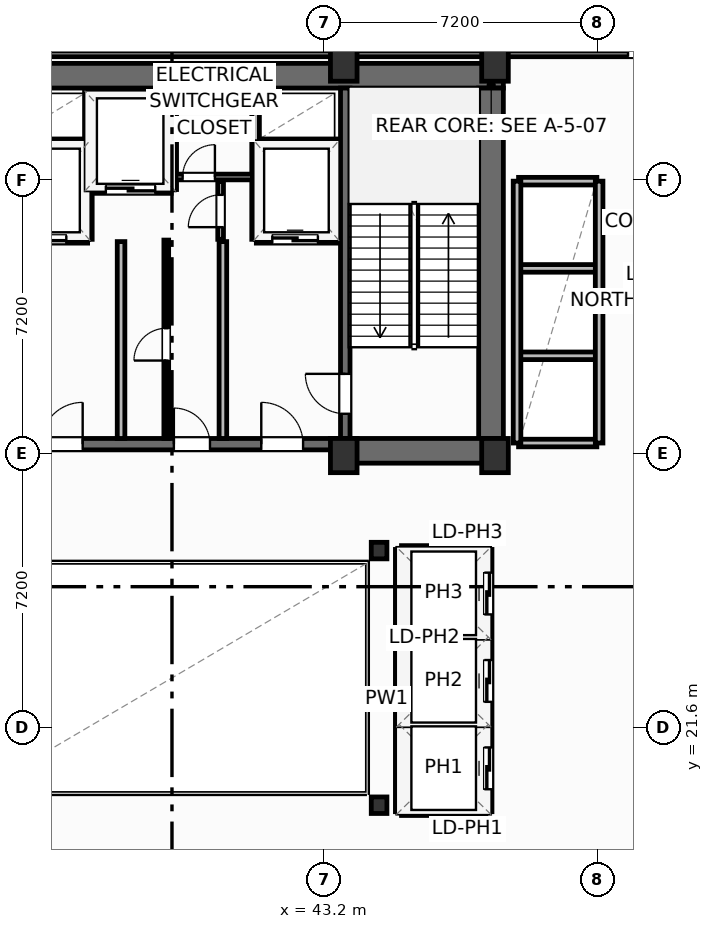
"""IFC4 building model, lengths in metres.
Left out: names, types, materials, properties, quantities, classifications, styles, units other than length and angle.
Written with IfcOpenShell. Run it as: python <this file> out.ifc"""

import sys

from ifc_helpers import new_model, si_unit, direction, frame, frame_2d, origin, origin_2d, place, context, subcontext, project, spatial, rectangle, i_section, extrude, element, fill, save


model = new_model("IFC4")
c1 = context("Model", 3, precision=1e-05, world=origin(), true_north=direction((0.0, 1.0)))
c2 = subcontext(c1, "Body", "Model", "MODEL_VIEW")
j1 = project(units=[si_unit("LENGTHUNIT", "METRE"), si_unit("PLANEANGLEUNIT", "RADIAN")], contexts=[c1])
p1 = place(None, origin())
s1 = spatial("IfcSite", under=j1, at=p1, CompositionType="ELEMENT")
p2 = place(p1, origin())
s2 = spatial("IfcBuilding", under=s1, at=p2, CompositionType="ELEMENT")
p3 = place(p2, frame((0.0, 0.0, 207.9)))
s3 = spatial("IfcBuildingStorey", under=s2, at=p3, CompositionType="ELEMENT", Elevation=207.9)
for number, where, z_axis, x_axis in (
    (1, (43.72, 28.75, 0.0), (0.0, 0.0, 1.0), (1.0, 0.0, 0.0)),
    (2, (47.7, 28.75, 0.0), (0.0, 0.0, 1.0), (1.0, 0.0, 0.0)),
    (3, (43.72, 39.05, 0.0), (0.0, 0.0, 1.0), (1.0, 0.0, 0.0)),
    (4, (47.7, 39.05, 0.0), (0.0, 0.0, 1.0), (1.0, 0.0, 0.0)),
):
    element("IfcColumn", number, at=place(p3, frame(where, z_axis=z_axis, x_axis=x_axis)), inside=s3, PredefinedType="COLUMN", context=c2, shape_type="SweptSolid", body=[
        extrude(rectangle(XDim=0.7, YDim=0.9, at=origin_2d()), origin(), (0.0, 0.0, 1.0), 4.8),
    ])
for number, where, z_axis, x_axis in (
    (5, (44.65, 19.55, 0.0), (0.0, 0.0, 1.0), (1.0, 0.0, 0.0)),
    (6, (44.65, 26.25, 0.0), (0.0, 0.0, 1.0), (1.0, 0.0, 0.0)),
):
    element("IfcColumn", number, at=place(p3, frame(where, z_axis=z_axis, x_axis=x_axis)), inside=s3, PredefinedType="COLUMN", context=c2, shape_type="SweptSolid", body=[
        extrude(i_section(OverallWidth=0.412, OverallDepth=0.435, WebThickness=0.036, FlangeThickness=0.057, FilletRadius=0.025, at=origin_2d()), origin(), (0.0, 0.0, 1.0), 4.8),
    ])
p4 = place(p3, frame((30.48, 38.745, 0.0), z_axis=(0.0, 0.0, 1.0), x_axis=(1.0, 0.0, 0.0)))
e7 = element("IfcWall", 7, at=p4, inside=s3, PredefinedType="SHEAR", context=c2, shape_type="SweptSolid", body=[
    extrude(rectangle(XDim=17.44, YDim=0.65, at=frame_2d((8.72, 0.0))), origin(), (0.0, 0.0, 1.0), 4.55),
])
p5 = place(p3, frame((47.595, 29.2, 0.0), z_axis=(0.0, 0.0, 1.0), x_axis=(0.0, 1.0, 0.0)))
e8 = element("IfcWall", 8, at=p5, inside=s3, PredefinedType="SHEAR", context=c2, shape_type="SweptSolid", body=[
    extrude(rectangle(XDim=9.22, YDim=0.65, at=frame_2d((4.61, 0.0))), origin(), (0.0, 0.0, 1.0), 4.55),
])
p6 = place(p3, frame((43.6, 28.875, 0.0), z_axis=(0.0, 0.0, 1.0), x_axis=(1.0, 0.0, 0.0)))
e9 = element("IfcWall", 9, at=p6, inside=s3, PredefinedType="SHEAR", context=c2, shape_type="SweptSolid", body=[
    extrude(rectangle(XDim=4.32, YDim=0.65, at=frame_2d((2.16, 0.0))), origin(), (0.0, 0.0, 1.0), 4.55),
])
p7 = place(p3, frame((34.8, 29.05, 0.0), z_axis=(0.0, 0.0, 1.0), x_axis=(1.0, 0.0, 0.0)))
e10 = element("IfcWall", 10, at=p7, inside=s3, PredefinedType="SHEAR", context=c2, shape_type="SweptSolid", body=[
    extrude(rectangle(XDim=8.8, YDim=0.3, at=frame_2d((4.4, 0.0))), origin(), (0.0, 0.0, 1.0), 4.55),
])
p8 = place(p7, frame((0.95, 0.0, 0.0)))
e11 = element("IfcOpeningElement", 11, at=p8, cuts=e10, PredefinedType="OPENING", context=c2, shape_type="SweptSolid", body=[
    extrude(rectangle(XDim=1.1, YDim=2.15, at=frame_2d((0.55, 1.075))), frame((0.0, 0.16, 0.0), z_axis=(0.0, -1.0, 0.0), x_axis=(1.0, 0.0, 0.0)), (0.0, 0.0, 1.0), 0.32),
])
p9 = place(p7, frame((6.75, 0.0, 0.0)))
e12 = element("IfcOpeningElement", 12, at=p9, cuts=e10, PredefinedType="OPENING", context=c2, shape_type="SweptSolid", body=[
    extrude(rectangle(XDim=1.1, YDim=2.15, at=frame_2d((0.55, 1.075))), frame((0.0, 0.16, 0.0), z_axis=(0.0, -1.0, 0.0), x_axis=(1.0, 0.0, 0.0)), (0.0, 0.0, 1.0), 0.32),
])
p10 = place(p7, frame((4.45, 0.0, 0.0)))
e13 = element("IfcOpeningElement", 13, at=p10, cuts=e10, PredefinedType="OPENING", context=c2, shape_type="SweptSolid", body=[
    extrude(rectangle(XDim=0.95, YDim=2.15, at=frame_2d((0.475, 1.075))), frame((0.0, 0.16, 0.0), z_axis=(0.0, -1.0, 0.0), x_axis=(1.0, 0.0, 0.0)), (0.0, 0.0, 1.0), 0.32),
])
p11 = place(p3, frame((43.76, 29.2, 0.0), z_axis=(0.0, 0.0, 1.0), x_axis=(0.0, 1.0, 0.0)))
e14 = element("IfcWall", 14, at=p11, inside=s3, PredefinedType="SHEAR", context=c2, shape_type="SweptSolid", body=[
    extrude(rectangle(XDim=9.22, YDim=0.25, at=frame_2d((4.61, 0.0))), origin(), (0.0, 0.0, 1.0), 4.55),
])
p12 = place(p11, frame((0.65, 0.0, 0.0)))
e15 = element("IfcOpeningElement", 15, at=p12, cuts=e14, PredefinedType="OPENING", context=c2, shape_type="SweptSolid", body=[
    extrude(rectangle(XDim=1.05, YDim=2.15, at=frame_2d((0.525, 1.075))), frame((0.0, 0.135, 0.0), z_axis=(0.0, -1.0, 0.0), x_axis=(1.0, 0.0, 0.0)), (0.0, 0.0, 1.0), 0.27),
])
p13 = place(p3, frame((8.315, 33.164, 0.0), z_axis=(0.0, 0.0, 1.0), x_axis=(0.935222646765, 0.354060165759, 0.0)))
e16 = element("IfcWall", 16, at=p13, inside=s3, PredefinedType="SOLIDWALL", context=c2, shape_type="SweptSolid", body=[
    extrude(rectangle(XDim=52.2, YDim=0.22, at=frame_2d((26.1, 0.0))), origin(), (0.0, 0.0, 1.0), 3.83),
])
p14 = place(p13, frame((23.64, 0.0, 0.0)))
e17 = element("IfcOpeningElement", 17, at=p14, cuts=e16, PredefinedType="OPENING", context=c2, shape_type="SweptSolid", body=[
    extrude(rectangle(XDim=1.85, YDim=2.3, at=frame_2d((0.925, 1.15))), frame((0.0, 0.12, 0.0), z_axis=(0.0, -1.0, 0.0), x_axis=(1.0, 0.0, 0.0)), (0.0, 0.0, 1.0), 0.24),
])
p15 = place(p13, frame((0.55, 0.0, 0.75)))
e18 = element("IfcOpeningElement", 18, at=p15, cuts=e16, PredefinedType="OPENING", context=c2, shape_type="SweptSolid", body=[
    extrude(rectangle(XDim=1.85, YDim=1.75, at=frame_2d((0.925, 0.875))), frame((0.0, 0.12, 0.0), z_axis=(0.0, -1.0, 0.0), x_axis=(1.0, 0.0, 0.0)), (0.0, 0.0, 1.0), 0.24),
])
p16 = place(p13, frame((49.8, 0.0, 0.75)))
e19 = element("IfcOpeningElement", 19, at=p16, cuts=e16, PredefinedType="OPENING", context=c2, shape_type="SweptSolid", body=[
    extrude(rectangle(XDim=1.85, YDim=1.75, at=frame_2d((0.925, 0.875))), frame((0.0, 0.12, 0.0), z_axis=(0.0, -1.0, 0.0), x_axis=(1.0, 0.0, 0.0)), (0.0, 0.0, 1.0), 0.24),
])
p17 = place(p3, frame((20.0, 39.32, 0.0), z_axis=(0.0, 0.0, 1.0), x_axis=(1.0, 0.0, 0.0)))
e20 = element("IfcWall", 20, at=p17, inside=s3, PredefinedType="PARTITIONING", context=c2, shape_type="SweptSolid", body=[
    extrude(rectangle(XDim=40.0, YDim=0.15, at=frame_2d((20.0, 0.0))), origin(), (0.0, 0.0, 1.0), 4.55),
])
p18 = place(p17, frame((31.2, 0.0, 0.0)))
e21 = element("IfcOpeningElement", 21, at=p18, cuts=e20, PredefinedType="OPENING", context=c2, shape_type="SweptSolid", body=[
    extrude(rectangle(XDim=1.0, YDim=2.05, at=frame_2d((0.5, 1.025))), frame((0.0, 0.085, 0.0), z_axis=(0.0, -1.0, 0.0), x_axis=(1.0, 0.0, 0.0)), (0.0, 0.0, 1.0), 0.17),
])
for number, where, z_axis, x_axis in (
    (22, (37.86, 29.2, 0.0), (0.0, 0.0, 1.0), (0.0, 1.0, 0.0)),
    (23, (40.54, 29.2, 0.0), (0.0, 0.0, 1.0), (0.0, 1.0, 0.0)),
):
    element("IfcWall", number, at=place(p3, frame(where, z_axis=z_axis, x_axis=x_axis)), inside=s3, PredefinedType="PARTITIONING", context=c2, shape_type="SweptSolid", body=[
        extrude(rectangle(XDim=5.18, YDim=0.2, at=frame_2d((2.59, 0.0))), origin(), (0.0, 0.0, 1.0), 4.55),
    ])
p19 = place(p3, frame((34.8, 34.44, 0.0), z_axis=(0.0, 0.0, 1.0), x_axis=(1.0, 0.0, 0.0)))
e24 = element("IfcWall", 24, at=p19, inside=s3, PredefinedType="PARTITIONING", context=c2, shape_type="SweptSolid", body=[
    extrude(rectangle(XDim=2.18, YDim=0.2, at=frame_2d((1.09, 0.0))), origin(), (0.0, 0.0, 1.0), 4.55),
])
p20 = place(p19, frame((0.42, 0.0, 0.0)))
e25 = element("IfcOpeningElement", 25, at=p20, cuts=e24, PredefinedType="OPENING", context=c2, shape_type="SweptSolid", body=[
    extrude(rectangle(XDim=1.2, YDim=2.2, at=frame_2d((0.6, 1.1))), frame((0.0, 0.11, 0.0), z_axis=(0.0, -1.0, 0.0), x_axis=(1.0, 0.0, 0.0)), (0.0, 0.0, 1.0), 0.22),
])
p21 = place(p3, frame((34.8, 36.98, 0.0), z_axis=(0.0, 0.0, 1.0), x_axis=(1.0, 0.0, 0.0)))
e26 = element("IfcWall", 26, at=p21, inside=s3, PredefinedType="PARTITIONING", context=c2, shape_type="SweptSolid", body=[
    extrude(rectangle(XDim=2.18, YDim=0.2, at=frame_2d((1.09, 0.0))), origin(), (0.0, 0.0, 1.0), 4.55),
])
p22 = place(p3, frame((37.0, 34.44, 0.0), z_axis=(0.0, 0.0, 1.0), x_axis=(0.0, 1.0, 0.0)))
e27 = element("IfcWall", 27, at=p22, inside=s3, PredefinedType="PARTITIONING", context=c2, shape_type="SweptSolid", body=[
    extrude(rectangle(XDim=3.9, YDim=0.2, at=frame_2d((1.95, 0.0))), origin(), (0.0, 0.0, 1.0), 4.55),
])
p23 = place(p3, frame((41.42, 34.44, 0.0), z_axis=(0.0, 0.0, 1.0), x_axis=(1.0, 0.0, 0.0)))
e28 = element("IfcWall", 28, at=p23, inside=s3, PredefinedType="PARTITIONING", context=c2, shape_type="SweptSolid", body=[
    extrude(rectangle(XDim=2.18, YDim=0.2, at=frame_2d((1.09, 0.0))), origin(), (0.0, 0.0, 1.0), 4.55),
])
p24 = place(p23, frame((0.42, 0.0, 0.0)))
e29 = element("IfcOpeningElement", 29, at=p24, cuts=e28, PredefinedType="OPENING", context=c2, shape_type="SweptSolid", body=[
    extrude(rectangle(XDim=1.2, YDim=2.2, at=frame_2d((0.6, 1.1))), frame((0.0, 0.11, 0.0), z_axis=(0.0, -1.0, 0.0), x_axis=(1.0, 0.0, 0.0)), (0.0, 0.0, 1.0), 0.22),
])
p25 = place(p3, frame((41.42, 36.98, 0.0), z_axis=(0.0, 0.0, 1.0), x_axis=(1.0, 0.0, 0.0)))
e30 = element("IfcWall", 30, at=p25, inside=s3, PredefinedType="PARTITIONING", context=c2, shape_type="SweptSolid", body=[
    extrude(rectangle(XDim=2.18, YDim=0.2, at=frame_2d((1.09, 0.0))), origin(), (0.0, 0.0, 1.0), 4.55),
])
p26 = place(p3, frame((41.4, 34.44, 0.0), z_axis=(0.0, 0.0, 1.0), x_axis=(0.0, 1.0, 0.0)))
e31 = element("IfcWall", 31, at=p26, inside=s3, PredefinedType="PARTITIONING", context=c2, shape_type="SweptSolid", body=[
    extrude(rectangle(XDim=3.9, YDim=0.2, at=frame_2d((1.95, 0.0))), origin(), (0.0, 0.0, 1.0), 4.55),
])
p27 = place(p3, frame((37.06, 35.75, 0.0), z_axis=(0.0, 0.0, 1.0), x_axis=(1.0, 0.0, 0.0)))
e32 = element("IfcWall", 32, at=p27, inside=s3, PredefinedType="PARTITIONING", context=c2, shape_type="SweptSolid", body=[
    extrude(rectangle(XDim=2.12, YDim=0.2, at=frame_2d((1.06, 0.0))), origin(), (0.0, 0.0, 1.0), 4.55),
])
p28 = place(p27, frame((0.4, 0.0, 0.0)))
e33 = element("IfcOpeningElement", 33, at=p28, cuts=e32, PredefinedType="OPENING", context=c2, shape_type="SweptSolid", body=[
    extrude(rectangle(XDim=1.3, YDim=2.2, at=frame_2d((0.65, 1.1))), frame((0.0, 0.11, 0.0), z_axis=(0.0, -1.0, 0.0), x_axis=(1.0, 0.0, 0.0)), (0.0, 0.0, 1.0), 0.22),
])
p29 = place(p3, frame((39.22, 35.75, 0.0), z_axis=(0.0, 0.0, 1.0), x_axis=(0.0, 1.0, 0.0)))
e34 = element("IfcWall", 34, at=p29, inside=s3, PredefinedType="PARTITIONING", context=c2, shape_type="SweptSolid", body=[
    extrude(rectangle(XDim=2.59, YDim=0.2, at=frame_2d((1.295, 0.0))), origin(), (0.0, 0.0, 1.0), 4.55),
])
p30 = place(p3, frame((39.3, 36.08, 0.0), z_axis=(0.0, 0.0, 1.0), x_axis=(1.0, 0.0, 0.0)))
e35 = element("IfcWall", 35, at=p30, inside=s3, PredefinedType="PARTITIONING", context=c2, shape_type="SweptSolid", body=[
    extrude(rectangle(XDim=2.02, YDim=0.15, at=frame_2d((1.01, 0.0))), origin(), (0.0, 0.0, 1.0), 4.55),
])
p31 = place(p30, frame((0.18, 0.0, 0.0)))
e36 = element("IfcOpeningElement", 36, at=p31, cuts=e35, PredefinedType="OPENING", context=c2, shape_type="SweptSolid", body=[
    extrude(rectangle(XDim=0.85, YDim=2.05, at=frame_2d((0.425, 1.025))), frame((0.0, 0.085, 0.0), z_axis=(0.0, -1.0, 0.0), x_axis=(1.0, 0.0, 0.0)), (0.0, 0.0, 1.0), 0.17),
])
p32 = place(p3, frame((40.48, 34.44, 0.0), z_axis=(0.0, 0.0, 1.0), x_axis=(0.0, 1.0, 0.0)))
e37 = element("IfcWall", 37, at=p32, inside=s3, PredefinedType="PARTITIONING", context=c2, shape_type="SweptSolid", body=[
    extrude(rectangle(XDim=1.52, YDim=0.15, at=frame_2d((0.76, 0.0))), origin(), (0.0, 0.0, 1.0), 4.55),
])
p33 = place(p32, frame((0.32, 0.0, 0.0)))
e38 = element("IfcOpeningElement", 38, at=p33, cuts=e37, PredefinedType="OPENING", context=c2, shape_type="SweptSolid", body=[
    extrude(rectangle(XDim=0.85, YDim=2.05, at=frame_2d((0.425, 1.025))), frame((0.0, 0.085, 0.0), z_axis=(0.0, -1.0, 0.0), x_axis=(1.0, 0.0, 0.0)), (0.0, 0.0, 1.0), 0.17),
])
p34 = place(p3, frame((39.05, 29.2, 0.0), z_axis=(0.0, 0.0, 1.0), x_axis=(0.0, 1.0, 0.0)))
e39 = element("IfcWall", 39, at=p34, inside=s3, PredefinedType="PARTITIONING", context=c2, shape_type="SweptSolid", body=[
    extrude(rectangle(XDim=5.22, YDim=0.125, at=frame_2d((2.61, 0.0))), origin(), (0.0, 0.0, 1.0), 4.55),
])
p35 = place(p34, frame((2.05, 0.0, 0.0)))
e40 = element("IfcOpeningElement", 40, at=p35, cuts=e39, PredefinedType="OPENING", context=c2, shape_type="SweptSolid", body=[
    extrude(rectangle(XDim=0.85, YDim=2.05, at=frame_2d((0.425, 1.025))), frame((0.0, 0.073, 0.0), z_axis=(0.0, -1.0, 0.0), x_axis=(1.0, 0.0, 0.0)), (0.0, 0.0, 1.0), 0.145),
])
for number, where, z_axis, x_axis in (
    (41, (48.32, 31.375, 0.0), (0.0, 0.0, 1.0), (1.0, 0.0, 0.0)),
    (42, (48.32, 33.675, 0.0), (0.0, 0.0, 1.0), (1.0, 0.0, 0.0)),
):
    element("IfcWall", number, at=place(p3, frame(where, z_axis=z_axis, x_axis=x_axis)), inside=s3, PredefinedType="PARTITIONING", context=c2, shape_type="SweptSolid", body=[
        extrude(rectangle(XDim=2.06, YDim=0.2, at=frame_2d((1.03, 0.0))), origin(), (0.0, 0.0, 1.0), 4.55),
    ])
p36 = place(p3, frame((48.32, 29.08, 0.0), z_axis=(0.0, 0.0, 1.0), x_axis=(1.0, 0.0, 0.0)))
e43 = element("IfcWall", 43, at=p36, inside=s3, PredefinedType="PARTITIONING", context=c2, shape_type="SweptSolid", body=[
    extrude(rectangle(XDim=2.06, YDim=0.2, at=frame_2d((1.03, 0.0))), origin(), (0.0, 0.0, 1.0), 3.762),
])
p37 = place(p3, frame((48.32, 35.97, 0.0), z_axis=(0.0, 0.0, 1.0), x_axis=(1.0, 0.0, 0.0)))
e44 = element("IfcWall", 44, at=p37, inside=s3, PredefinedType="PARTITIONING", context=c2, shape_type="SweptSolid", body=[
    extrude(rectangle(XDim=2.06, YDim=0.2, at=frame_2d((1.03, 0.0))), origin(), (0.0, 0.0, 1.0), 4.55),
])
for number, where, z_axis, x_axis in (
    (45, (48.28, 29.08, 0.0), (0.0, 0.0, 1.0), (0.0, 1.0, 0.0)),
    (46, (50.44, 29.08, 0.0), (0.0, 0.0, 1.0), (0.0, 1.0, 0.0)),
):
    element("IfcWall", number, at=place(p3, frame(where, z_axis=z_axis, x_axis=x_axis)), inside=s3, PredefinedType="PARTITIONING", context=c2, shape_type="SweptSolid", body=[
        extrude(rectangle(XDim=6.89, YDim=0.2, at=frame_2d((3.445, 0.0))), origin(), (0.0, 0.0, 1.0), 4.55),
    ])
for number, where, z_axis, x_axis in (
    (47, (45.24, 21.675, 0.0), (0.0, 0.0, 1.0), (1.0, 0.0, 0.0)),
    (48, (45.24, 23.975, 0.0), (0.0, 0.0, 1.0), (1.0, 0.0, 0.0)),
):
    element("IfcWall", number, at=place(p3, frame(where, z_axis=z_axis, x_axis=x_axis)), inside=s3, PredefinedType="PARTITIONING", context=c2, shape_type="SweptSolid", body=[
        extrude(rectangle(XDim=2.22, YDim=0.2, at=frame_2d((1.11, 0.0))), origin(), (0.0, 0.0, 1.0), 4.55),
    ])
p38 = place(p3, frame((45.24, 19.38, 0.0), z_axis=(0.0, 0.0, 1.0), x_axis=(1.0, 0.0, 0.0)))
e49 = element("IfcWall", 49, at=p38, inside=s3, PredefinedType="PARTITIONING", context=c2, shape_type="SweptSolid", body=[
    extrude(rectangle(XDim=2.22, YDim=0.2, at=frame_2d((1.11, 0.0))), origin(), (0.0, 0.0, 1.0), 3.762),
])
p39 = place(p3, frame((45.24, 26.28, 0.0), z_axis=(0.0, 0.0, 1.0), x_axis=(1.0, 0.0, 0.0)))
e50 = element("IfcWall", 50, at=p39, inside=s3, PredefinedType="PARTITIONING", context=c2, shape_type="SweptSolid", body=[
    extrude(rectangle(XDim=2.22, YDim=0.2, at=frame_2d((1.11, 0.0))), origin(), (0.0, 0.0, 1.0), 4.55),
])
p40 = place(p3, frame((45.18, 19.38, 0.0), z_axis=(0.0, 0.0, 1.0), x_axis=(0.0, 1.0, 0.0)))
e51 = element("IfcWall", 51, at=p40, inside=s3, PredefinedType="PARTITIONING", context=c2, shape_type="SweptSolid", body=[
    extrude(rectangle(XDim=6.9, YDim=0.2, at=frame_2d((3.45, 0.0))), origin(), (0.0, 0.0, 1.0), 4.55),
])
p41 = place(p3, frame((47.52, 19.38, 0.0), z_axis=(0.0, 0.0, 1.0), x_axis=(0.0, 1.0, 0.0)))
e52 = element("IfcWall", 52, at=p41, inside=s3, PredefinedType="PARTITIONING", context=c2, shape_type="SweptSolid", body=[
    extrude(rectangle(XDim=6.9, YDim=0.2, at=frame_2d((3.45, 0.0))), origin(), (0.0, 0.0, 1.0), 4.55),
])
p42 = place(p41, frame((0.59, 0.0, 0.0)))
e53 = element("IfcOpeningElement", 53, at=p42, cuts=e52, PredefinedType="OPENING", context=c2, shape_type="SweptSolid", body=[
    extrude(rectangle(XDim=1.1, YDim=2.15, at=frame_2d((0.55, 1.075))), frame((0.0, 0.11, 0.0), z_axis=(0.0, -1.0, 0.0), x_axis=(1.0, 0.0, 0.0)), (0.0, 0.0, 1.0), 0.22),
])
p43 = place(p41, frame((2.89, 0.0, 0.0)))
e54 = element("IfcOpeningElement", 54, at=p43, cuts=e52, PredefinedType="OPENING", context=c2, shape_type="SweptSolid", body=[
    extrude(rectangle(XDim=1.1, YDim=2.15, at=frame_2d((0.55, 1.075))), frame((0.0, 0.11, 0.0), z_axis=(0.0, -1.0, 0.0), x_axis=(1.0, 0.0, 0.0)), (0.0, 0.0, 1.0), 0.22),
])
p44 = place(p41, frame((5.19, 0.0, 0.0)))
e55 = element("IfcOpeningElement", 55, at=p44, cuts=e52, PredefinedType="OPENING", context=c2, shape_type="SweptSolid", body=[
    extrude(rectangle(XDim=1.1, YDim=2.15, at=frame_2d((0.55, 1.075))), frame((0.0, 0.11, 0.0), z_axis=(0.0, -1.0, 0.0), x_axis=(1.0, 0.0, 0.0)), (0.0, 0.0, 1.0), 0.22),
])
p45 = place(p18, origin())
e56 = element("IfcDoor", 56, at=p45, inside=s3, OperationType="SINGLE_SWING_RIGHT", PredefinedType="DOOR", context=c2, shape_type="SweptSolid", body=[
    extrude(rectangle(XDim=1.0, YDim=2.05, at=frame_2d((0.5, 1.025))), frame((0.0, 0.025, 0.0), z_axis=(0.0, -1.0, 0.0), x_axis=(1.0, 0.0, 0.0)), (0.0, 0.0, 1.0), 0.05),
])
fill(e21, e56)
p46 = place(p12, origin())
e57 = element("IfcDoor", 57, at=p46, inside=s3, OperationType="SINGLE_SWING_RIGHT", PredefinedType="DOOR", context=c2, shape_type="SweptSolid", body=[
    extrude(rectangle(XDim=1.05, YDim=2.15, at=frame_2d((0.525, 1.075))), frame((0.0, 0.025, 0.0), z_axis=(0.0, -1.0, 0.0), x_axis=(1.0, 0.0, 0.0)), (0.0, 0.0, 1.0), 0.05),
])
fill(e15, e57)
p47 = place(p8, origin())
e58 = element("IfcDoor", 58, at=p47, inside=s3, OperationType="SINGLE_SWING_RIGHT", PredefinedType="DOOR", context=c2, shape_type="SweptSolid", body=[
    extrude(rectangle(XDim=1.1, YDim=2.15, at=frame_2d((0.55, 1.075))), frame((0.0, 0.025, 0.0), z_axis=(0.0, -1.0, 0.0), x_axis=(1.0, 0.0, 0.0)), (0.0, 0.0, 1.0), 0.05),
])
fill(e11, e58)
p48 = place(p9, origin())
e59 = element("IfcDoor", 59, at=p48, inside=s3, OperationType="SINGLE_SWING_LEFT", PredefinedType="DOOR", context=c2, shape_type="SweptSolid", body=[
    extrude(rectangle(XDim=1.1, YDim=2.15, at=frame_2d((0.55, 1.075))), frame((0.0, 0.025, 0.0), z_axis=(0.0, -1.0, 0.0), x_axis=(1.0, 0.0, 0.0)), (0.0, 0.0, 1.0), 0.05),
])
fill(e12, e59)
p49 = place(p20, origin())
e60 = element("IfcDoor", 60, at=p49, inside=s3, OperationType="SLIDING_TO_LEFT", PredefinedType="DOOR", context=c2, shape_type="SweptSolid", body=[
    extrude(rectangle(XDim=1.2, YDim=2.2, at=frame_2d((0.6, 1.1))), frame((0.0, 0.025, 0.0), z_axis=(0.0, -1.0, 0.0), x_axis=(1.0, 0.0, 0.0)), (0.0, 0.0, 1.0), 0.05),
])
fill(e25, e60)
p50 = place(p24, origin())
e61 = element("IfcDoor", 61, at=p50, inside=s3, OperationType="SLIDING_TO_LEFT", PredefinedType="DOOR", context=c2, shape_type="SweptSolid", body=[
    extrude(rectangle(XDim=1.2, YDim=2.2, at=frame_2d((0.6, 1.1))), frame((0.0, 0.025, 0.0), z_axis=(0.0, -1.0, 0.0), x_axis=(1.0, 0.0, 0.0)), (0.0, 0.0, 1.0), 0.05),
])
fill(e29, e61)
p51 = place(p28, origin())
e62 = element("IfcDoor", 62, at=p51, inside=s3, OperationType="SLIDING_TO_LEFT", PredefinedType="DOOR", context=c2, shape_type="SweptSolid", body=[
    extrude(rectangle(XDim=1.3, YDim=2.2, at=frame_2d((0.65, 1.1))), frame((0.0, 0.025, 0.0), z_axis=(0.0, -1.0, 0.0), x_axis=(1.0, 0.0, 0.0)), (0.0, 0.0, 1.0), 0.05),
])
fill(e33, e62)
p52 = place(p31, origin())
e63 = element("IfcDoor", 63, at=p52, inside=s3, OperationType="SINGLE_SWING_RIGHT", PredefinedType="DOOR", context=c2, shape_type="SweptSolid", body=[
    extrude(rectangle(XDim=0.85, YDim=2.05, at=frame_2d((0.425, 1.025))), frame((0.0, 0.025, 0.0), z_axis=(0.0, -1.0, 0.0), x_axis=(1.0, 0.0, 0.0)), (0.0, 0.0, 1.0), 0.05),
])
fill(e36, e63)
p53 = place(p33, origin())
e64 = element("IfcDoor", 64, at=p53, inside=s3, OperationType="SINGLE_SWING_LEFT", PredefinedType="DOOR", context=c2, shape_type="SweptSolid", body=[
    extrude(rectangle(XDim=0.85, YDim=2.05, at=frame_2d((0.425, 1.025))), frame((0.0, 0.025, 0.0), z_axis=(0.0, -1.0, 0.0), x_axis=(1.0, 0.0, 0.0)), (0.0, 0.0, 1.0), 0.05),
])
fill(e38, e64)
p54 = place(p35, origin())
e65 = element("IfcDoor", 65, at=p54, inside=s3, OperationType="SINGLE_SWING_LEFT", PredefinedType="DOOR", context=c2, shape_type="SweptSolid", body=[
    extrude(rectangle(XDim=0.85, YDim=2.05, at=frame_2d((0.425, 1.025))), frame((0.0, 0.025, 0.0), z_axis=(0.0, -1.0, 0.0), x_axis=(1.0, 0.0, 0.0)), (0.0, 0.0, 1.0), 0.05),
])
fill(e40, e65)
p55 = place(p10, origin())
e66 = element("IfcDoor", 66, at=p55, inside=s3, OperationType="SINGLE_SWING_LEFT", PredefinedType="DOOR", context=c2, shape_type="SweptSolid", body=[
    extrude(rectangle(XDim=0.95, YDim=2.15, at=frame_2d((0.475, 1.075))), frame((0.0, 0.025, 0.0), z_axis=(0.0, -1.0, 0.0), x_axis=(1.0, 0.0, 0.0)), (0.0, 0.0, 1.0), 0.05),
])
fill(e13, e66)
p56 = place(p42, origin())
e67 = element("IfcDoor", 67, at=p56, inside=s3, OperationType="SLIDING_TO_LEFT", PredefinedType="DOOR", context=c2, shape_type="SweptSolid", body=[
    extrude(rectangle(XDim=1.1, YDim=2.15, at=frame_2d((0.55, 1.075))), frame((0.0, 0.025, 0.0), z_axis=(0.0, -1.0, 0.0), x_axis=(1.0, 0.0, 0.0)), (0.0, 0.0, 1.0), 0.05),
])
fill(e53, e67)
p57 = place(p43, origin())
e68 = element("IfcDoor", 68, at=p57, inside=s3, OperationType="SLIDING_TO_LEFT", PredefinedType="DOOR", context=c2, shape_type="SweptSolid", body=[
    extrude(rectangle(XDim=1.1, YDim=2.15, at=frame_2d((0.55, 1.075))), frame((0.0, 0.025, 0.0), z_axis=(0.0, -1.0, 0.0), x_axis=(1.0, 0.0, 0.0)), (0.0, 0.0, 1.0), 0.05),
])
fill(e54, e68)
p58 = place(p44, origin())
e69 = element("IfcDoor", 69, at=p58, inside=s3, OperationType="SLIDING_TO_LEFT", PredefinedType="DOOR", context=c2, shape_type="SweptSolid", body=[
    extrude(rectangle(XDim=1.1, YDim=2.15, at=frame_2d((0.55, 1.075))), frame((0.0, 0.025, 0.0), z_axis=(0.0, -1.0, 0.0), x_axis=(1.0, 0.0, 0.0)), (0.0, 0.0, 1.0), 0.05),
])
fill(e55, e69)
save(model, sys.argv[1])
